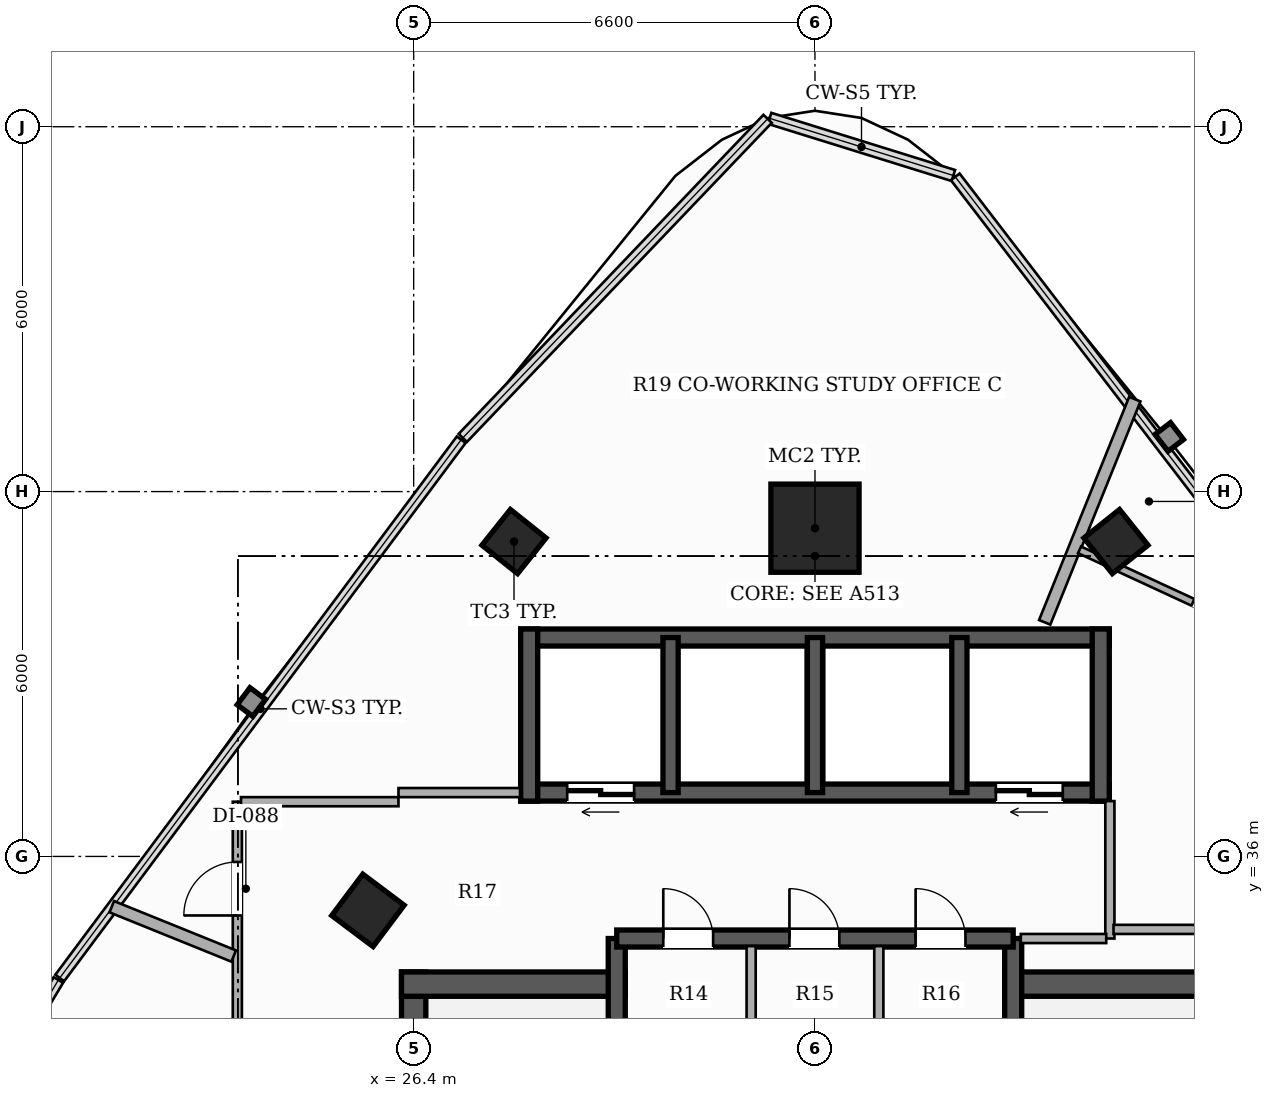
"""IFC4 building model, lengths in metres.
Left out: names, types, materials, properties, quantities, classifications, styles, units other than length and angle.
Written with IfcOpenShell. Run it as: python <this file> out.ifc"""

import sys

from ifc_helpers import new_model, si_unit, direction, frame, frame_2d, origin, origin_2d, place, context, subcontext, project, spatial, rectangle, hollow_rectangle, extrude, element, fill, save


model = new_model("IFC4")
c1 = context("Model", 3, precision=1e-05, world=origin(), true_north=direction((0.0, 1.0)))
c2 = subcontext(c1, "Body", "Model", "MODEL_VIEW")
j1 = project(units=[si_unit("LENGTHUNIT", "METRE"), si_unit("PLANEANGLEUNIT", "RADIAN")], contexts=[c1])
p1 = place(None, origin())
s1 = spatial("IfcSite", under=j1, at=p1, CompositionType="ELEMENT")
p2 = place(p1, origin())
s2 = spatial("IfcBuilding", under=s1, at=p2, CompositionType="ELEMENT")
p3 = place(p2, frame((0.0, 0.0, 150.65)))
s3 = spatial("IfcBuildingStorey", under=s2, at=p3, CompositionType="ELEMENT", Elevation=150.65)
p4 = place(p3, frame((26.4, 26.5, 0.0), z_axis=(0.0, 0.0, 1.0), x_axis=(0.0, 1.0, 0.0)))
e1 = element("IfcWall", 1, at=p4, inside=s3, PredefinedType="SHEAR", context=c2, shape_type="SweptSolid", body=[
    extrude(rectangle(XDim=7.6, YDim=0.4, at=frame_2d((3.8, 0.0))), origin(), (0.0, 0.0, 1.0), 3.3),
])
for number, where, z_axis, x_axis in (
    (2, (26.2, 33.9, 0.0), (0.0, 0.0, 1.0), (1.0, 0.0, 0.0)),
    (3, (36.12, 33.9, 0.0), (0.0, 0.0, 1.0), (1.0, 0.0, 0.0)),
):
    element("IfcWall", number, at=place(p3, frame(where, z_axis=z_axis, x_axis=x_axis)), inside=s3, PredefinedType="SHEAR", context=c2, shape_type="SweptSolid", body=[
        extrude(rectangle(XDim=3.68, YDim=0.4, at=frame_2d((1.84, 0.0))), origin(), (0.0, 0.0, 1.0), 3.3),
    ])
p5 = place(p3, frame((29.74, 26.5, 0.0), z_axis=(0.0, 0.0, 1.0), x_axis=(0.0, 1.0, 0.0)))
e4 = element("IfcWall", 4, at=p5, inside=s3, PredefinedType="SHEAR", context=c2, shape_type="SweptSolid", body=[
    extrude(rectangle(XDim=8.15, YDim=0.28, at=frame_2d((4.075, 0.0))), origin(), (0.0, 0.0, 1.0), 3.3),
])
p6 = place(p5, frame((0.6, 0.0, 0.0)))
e5 = element("IfcOpeningElement", 5, at=p6, cuts=e4, PredefinedType="OPENING", context=c2, shape_type="SweptSolid", body=[
    extrude(rectangle(XDim=1.05, YDim=2.15, at=frame_2d((0.525, 1.075))), frame((0.0, 0.15, 0.0), z_axis=(0.0, -1.0, 0.0), x_axis=(1.0, 0.0, 0.0)), (0.0, 0.0, 1.0), 0.3),
])
p7 = place(p3, frame((36.26, 26.5, 0.0), z_axis=(0.0, 0.0, 1.0), x_axis=(0.0, 1.0, 0.0)))
e6 = element("IfcWall", 6, at=p7, inside=s3, PredefinedType="SHEAR", context=c2, shape_type="SweptSolid", body=[
    extrude(rectangle(XDim=8.15, YDim=0.28, at=frame_2d((4.075, 0.0))), origin(), (0.0, 0.0, 1.0), 3.3),
])
p8 = place(p7, frame((0.6, 0.0, 0.0)))
e7 = element("IfcOpeningElement", 7, at=p8, cuts=e6, PredefinedType="OPENING", context=c2, shape_type="SweptSolid", body=[
    extrude(rectangle(XDim=1.05, YDim=2.15, at=frame_2d((0.525, 1.075))), frame((0.0, 0.15, 0.0), z_axis=(0.0, -1.0, 0.0), x_axis=(1.0, 0.0, 0.0)), (0.0, 0.0, 1.0), 0.3),
])
p9 = place(p3, frame((29.74, 34.65, 0.0), z_axis=(0.0, 0.0, 1.0), x_axis=(1.0, 0.0, 0.0)))
e8 = element("IfcWall", 8, at=p9, inside=s3, PredefinedType="SHEAR", context=c2, shape_type="SweptSolid", body=[
    extrude(rectangle(XDim=6.52, YDim=0.28, at=frame_2d((3.26, 0.0))), origin(), (0.0, 0.0, 1.0), 3.3),
])
p10 = place(p9, frame((0.765, 0.0, 0.0)))
e9 = element("IfcOpeningElement", 9, at=p10, cuts=e8, PredefinedType="OPENING", context=c2, shape_type="SweptSolid", body=[
    extrude(rectangle(XDim=0.82, YDim=2.1, at=frame_2d((0.41, 1.05))), frame((0.0, 0.15, 0.0), z_axis=(0.0, -1.0, 0.0), x_axis=(1.0, 0.0, 0.0)), (0.0, 0.0, 1.0), 0.3),
])
p11 = place(p9, frame((2.84, 0.0, 0.0)))
e10 = element("IfcOpeningElement", 10, at=p11, cuts=e8, PredefinedType="OPENING", context=c2, shape_type="SweptSolid", body=[
    extrude(rectangle(XDim=0.82, YDim=2.1, at=frame_2d((0.41, 1.05))), frame((0.0, 0.15, 0.0), z_axis=(0.0, -1.0, 0.0), x_axis=(1.0, 0.0, 0.0)), (0.0, 0.0, 1.0), 0.3),
])
p12 = place(p9, frame((4.915, 0.0, 0.0)))
e11 = element("IfcOpeningElement", 11, at=p12, cuts=e8, PredefinedType="OPENING", context=c2, shape_type="SweptSolid", body=[
    extrude(rectangle(XDim=0.82, YDim=2.1, at=frame_2d((0.41, 1.05))), frame((0.0, 0.15, 0.0), z_axis=(0.0, -1.0, 0.0), x_axis=(1.0, 0.0, 0.0)), (0.0, 0.0, 1.0), 0.3),
])
p13 = place(p3, frame((37.84, 37.05, 0.0), z_axis=(0.0, 0.0, 1.0), x_axis=(-1.0, 0.0, 0.0)))
e12 = element("IfcWall", 12, at=p13, inside=s3, PredefinedType="SHEAR", context=c2, shape_type="SweptSolid", body=[
    extrude(rectangle(XDim=9.68, YDim=0.28, at=frame_2d((4.84, 0.0))), origin(), (0.0, 0.0, 1.0), 3.3),
])
p14 = place(p13, frame((7.815, 0.0, 0.0)))
e13 = element("IfcOpeningElement", 13, at=p14, cuts=e12, PredefinedType="OPENING", context=c2, shape_type="SweptSolid", body=[
    extrude(rectangle(XDim=1.1, YDim=2.2, at=frame_2d((0.55, 1.1))), frame((0.0, 0.15, 0.0), z_axis=(0.0, -1.0, 0.0), x_axis=(1.0, 0.0, 0.0)), (0.0, 0.0, 1.0), 0.3),
])
p15 = place(p13, frame((0.765, 0.0, 0.0)))
e14 = element("IfcOpeningElement", 14, at=p15, cuts=e12, PredefinedType="OPENING", context=c2, shape_type="SweptSolid", body=[
    extrude(rectangle(XDim=1.1, YDim=2.2, at=frame_2d((0.55, 1.1))), frame((0.0, 0.15, 0.0), z_axis=(0.0, -1.0, 0.0), x_axis=(1.0, 0.0, 0.0)), (0.0, 0.0, 1.0), 0.3),
])
p16 = place(p3, frame((28.16, 39.6, 0.0), z_axis=(0.0, 0.0, 1.0), x_axis=(1.0, 0.0, 0.0)))
e15 = element("IfcWall", 15, at=p16, inside=s3, PredefinedType="SHEAR", context=c2, shape_type="SweptSolid", body=[
    extrude(rectangle(XDim=9.68, YDim=0.28, at=frame_2d((4.84, 0.0))), origin(), (0.0, 0.0, 1.0), 3.3),
])
for number, where, z_axis, x_axis in (
    (16, (28.3, 36.91, 0.0), (0.0, 0.0, 1.0), (0.0, 1.0, 0.0)),
    (17, (37.7, 36.91, 0.0), (0.0, 0.0, 1.0), (0.0, 1.0, 0.0)),
):
    element("IfcWall", number, at=place(p3, frame(where, z_axis=z_axis, x_axis=x_axis)), inside=s3, PredefinedType="SHEAR", context=c2, shape_type="SweptSolid", body=[
        extrude(rectangle(XDim=2.83, YDim=0.28, at=frame_2d((1.415, 0.0))), origin(), (0.0, 0.0, 1.0), 3.3),
    ])
for number, where, z_axis, x_axis in (
    (18, (30.625, 37.05, 0.0), (0.0, 0.0, 1.0), (0.0, 1.0, 0.0)),
    (19, (33.0, 37.05, 0.0), (0.0, 0.0, 1.0), (0.0, 1.0, 0.0)),
    (20, (35.375, 37.05, 0.0), (0.0, 0.0, 1.0), (0.0, 1.0, 0.0)),
):
    element("IfcWall", number, at=place(p3, frame(where, z_axis=z_axis, x_axis=x_axis)), inside=s3, PredefinedType="SHEAR", context=c2, shape_type="SweptSolid", body=[
        extrude(rectangle(XDim=2.55, YDim=0.25, at=frame_2d((1.275, 0.0))), origin(), (0.0, 0.0, 1.0), 3.3),
    ])
p17 = place(p3, frame((33.0, 41.398, 0.0), z_axis=(0.0, 0.0, 1.0), x_axis=(1.0, 0.0, 0.0)))
e21 = element("IfcColumn", 21, at=p17, inside=s3, PredefinedType="COLUMN", context=c2, shape_type="SweptSolid", body=[
    extrude(hollow_rectangle(XDim=1.45, YDim=1.45, WallThickness=0.045, at=origin_2d()), origin(), (0.0, 0.0, 1.0), 3.3),
])
p18 = place(p3, frame((25.648, 35.113, 0.0), z_axis=(0.0, 0.0, 1.0), x_axis=(0.600420225326, 0.799684658487, 0.0)))
e22 = element("IfcColumn", 22, at=p18, inside=s3, PredefinedType="COLUMN", context=c2, shape_type="SweptSolid", body=[
    extrude(hollow_rectangle(XDim=0.85, YDim=0.85, WallThickness=0.028, at=origin_2d()), origin(), (0.0, 0.0, 1.0), 3.3),
])
for number, where, z_axis, x_axis in (
    (23, (28.05, 41.178, 0.0), (0.0, 0.0, 1.0), (0.624, 0.782, 0.0)),
    (24, (37.95, 41.178, 0.0), (0.0, 0.0, 1.0), (-0.624, 0.782, 0.0)),
):
    element("IfcColumn", number, at=place(p3, frame(where, z_axis=z_axis, x_axis=x_axis)), inside=s3, PredefinedType="COLUMN", context=c2, shape_type="SweptSolid", body=[
        extrude(hollow_rectangle(XDim=0.75, YDim=0.75, WallThickness=0.025, at=origin_2d()), origin(), (0.0, 0.0, 1.0), 3.3),
    ])
p19 = place(p3, frame((37.85, 34.65, 0.0), z_axis=(0.0, 0.0, 1.0), x_axis=(0.0, 1.0, 0.0)))
e25 = element("IfcWall", 25, at=p19, inside=s3, PredefinedType="PARTITIONING", context=c2, shape_type="SweptSolid", body=[
    extrude(rectangle(XDim=2.26, YDim=0.15, at=frame_2d((1.13, 0.0))), origin(), (0.0, 0.0, 1.0), 3.06),
])
p20 = place(p3, frame((36.385, 34.65, 0.0), z_axis=(0.0, 0.0, 1.0), x_axis=(1.0, 0.0, 0.0)))
e26 = element("IfcWall", 26, at=p20, inside=s3, PredefinedType="PARTITIONING", context=c2, shape_type="SweptSolid", body=[
    extrude(rectangle(XDim=1.405, YDim=0.15, at=frame_2d((0.703, 0.0))), origin(), (0.0, 0.0, 1.0), 2.425),
])
for number, where, z_axis, x_axis in (
    (27, (31.95, 32.915, 0.0), (0.0, 0.0, 1.0), (0.0, 1.0, 0.0)),
    (28, (34.05, 32.915, 0.0), (0.0, 0.0, 1.0), (0.0, 1.0, 0.0)),
):
    element("IfcWall", number, at=place(p3, frame(where, z_axis=z_axis, x_axis=x_axis)), inside=s3, PredefinedType="PARTITIONING", context=c2, shape_type="SweptSolid", body=[
        extrude(rectangle(XDim=1.61, YDim=0.15, at=frame_2d((0.805, 0.0))), origin(), (0.0, 0.0, 1.0), 3.06),
    ])
p21 = place(p3, frame((23.5, 14.06, 0.0), z_axis=(0.0, 0.0, 1.0), x_axis=(0.0, 1.0, 0.0)))
e29 = element("IfcWall", 29, at=p21, inside=s3, PredefinedType="PARTITIONING", context=c2, shape_type="SweptSolid", body=[
    extrude(rectangle(XDim=22.84, YDim=0.15, at=frame_2d((11.42, 0.0))), origin(), (0.0, 0.0, 1.0), 2.413),
])
p22 = place(p21, frame((8.172, 0.0, 0.0)))
e30 = element("IfcOpeningElement", 30, at=p22, cuts=e29, PredefinedType="OPENING", context=c2, shape_type="SweptSolid", body=[
    extrude(rectangle(XDim=0.88, YDim=2.1, at=frame_2d((0.44, 1.05))), frame((0.0, 0.085, 0.0), z_axis=(0.0, -1.0, 0.0), x_axis=(1.0, 0.0, 0.0)), (0.0, 0.0, 1.0), 0.17),
])
p23 = place(p21, frame((20.969, 0.0, 0.0)))
e31 = element("IfcOpeningElement", 31, at=p23, cuts=e29, PredefinedType="OPENING", context=c2, shape_type="SweptSolid", body=[
    extrude(rectangle(XDim=0.88, YDim=2.1, at=frame_2d((0.44, 1.05))), frame((0.0, 0.085, 0.0), z_axis=(0.0, -1.0, 0.0), x_axis=(1.0, 0.0, 0.0)), (0.0, 0.0, 1.0), 0.17),
])
p24 = place(p21, frame((15.484, 0.0, 0.0)))
e32 = element("IfcOpeningElement", 32, at=p24, cuts=e29, PredefinedType="OPENING", context=c2, shape_type="SweptSolid", body=[
    extrude(rectangle(XDim=0.88, YDim=2.1, at=frame_2d((0.44, 1.05))), frame((0.0, 0.085, 0.0), z_axis=(0.0, -1.0, 0.0), x_axis=(1.0, 0.0, 0.0)), (0.0, 0.0, 1.0), 0.17),
])
p25 = place(p3, frame((23.56, 36.9, 0.0), z_axis=(0.0, 0.0, 1.0), x_axis=(1.0, 0.0, 0.0)))
e33 = element("IfcWall", 33, at=p25, inside=s3, PredefinedType="PARTITIONING", context=c2, shape_type="SweptSolid", body=[
    extrude(rectangle(XDim=2.59, YDim=0.15, at=frame_2d((1.295, 0.0))), origin(), (0.0, 0.0, 1.0), 2.413),
])
p26 = place(p3, frame((26.15, 37.05, 0.0), z_axis=(0.0, 0.0, 1.0), x_axis=(1.0, 0.0, 0.0)))
e34 = element("IfcWall", 34, at=p26, inside=s3, PredefinedType="PARTITIONING", context=c2, shape_type="SweptSolid", body=[
    extrude(rectangle(XDim=2.0, YDim=0.15, at=frame_2d((1.0, 0.0))), origin(), (0.0, 0.0, 1.0), 2.413),
])
p27 = place(p3, frame((37.91, 34.8, 0.0), z_axis=(0.0, 0.0, 1.0), x_axis=(1.0, 0.0, 0.0)))
e35 = element("IfcWall", 35, at=p27, inside=s3, PredefinedType="PARTITIONING", context=c2, shape_type="SweptSolid", body=[
    extrude(rectangle(XDim=1.94, YDim=0.15, at=frame_2d((0.97, 0.0))), origin(), (0.0, 0.0, 1.0), 2.721),
])
p28 = place(p3, frame((36.778, 39.85, 0.0), z_axis=(0.0, 0.0, 1.0), x_axis=(0.374430412004, 0.927255017008, 0.0)))
e36 = element("IfcWall", 36, at=p28, inside=s3, PredefinedType="PARTITIONING", context=c2, shape_type="SweptSolid", body=[
    extrude(rectangle(XDim=3.958, YDim=0.2, at=frame_2d((1.979, 0.0))), origin(), (0.0, 0.0, 1.0), 2.413),
])
p29 = place(p3, frame((23.44, 34.362, 0.0), z_axis=(0.0, 0.0, 1.0), x_axis=(-0.927021575741, 0.375007997395, 0.0)))
e37 = element("IfcWall", 37, at=p29, inside=s3, PredefinedType="PARTITIONING", context=c2, shape_type="SweptSolid", body=[
    extrude(rectangle(XDim=2.163, YDim=0.2, at=frame_2d((1.081, 0.0))), origin(), (0.0, 0.0, 1.0), 3.06),
])
p30 = place(p3, frame((37.351, 41.042, 0.0), z_axis=(0.0, 0.0, 1.0), x_axis=(0.907592371503, -0.419852458834, 0.0)))
e38 = element("IfcWall", 38, at=p30, inside=s3, PredefinedType="PARTITIONING", context=c2, shape_type="SweptSolid", body=[
    extrude(rectangle(XDim=4.93, YDim=0.12, at=frame_2d((2.465, 0.0))), origin(), (0.0, 0.0, 1.0), 2.413),
])
p31 = place(p30, frame((2.055, 0.0, 0.0)))
e39 = element("IfcOpeningElement", 39, at=p31, cuts=e38, PredefinedType="OPENING", context=c2, shape_type="SweptSolid", body=[
    extrude(rectangle(XDim=0.82, YDim=2.1, at=frame_2d((0.41, 1.05))), frame((0.0, 0.07, 0.0), z_axis=(0.0, -1.0, 0.0), x_axis=(1.0, 0.0, 0.0)), (0.0, 0.0, 1.0), 0.14),
])
p32 = place(p14, origin())
e40 = element("IfcDoor", 40, at=p32, inside=s3, OperationType="DOUBLE_DOOR_SLIDING", PredefinedType="DOOR", context=c2, shape_type="SweptSolid", body=[
    extrude(rectangle(XDim=1.1, YDim=2.2, at=frame_2d((0.55, 1.1))), frame((0.0, 0.025, 0.0), z_axis=(0.0, -1.0, 0.0), x_axis=(1.0, 0.0, 0.0)), (0.0, 0.0, 1.0), 0.05),
])
fill(e13, e40)
p33 = place(p15, origin())
e41 = element("IfcDoor", 41, at=p33, inside=s3, OperationType="DOUBLE_DOOR_SLIDING", PredefinedType="DOOR", context=c2, shape_type="SweptSolid", body=[
    extrude(rectangle(XDim=1.1, YDim=2.2, at=frame_2d((0.55, 1.1))), frame((0.0, 0.025, 0.0), z_axis=(0.0, -1.0, 0.0), x_axis=(1.0, 0.0, 0.0)), (0.0, 0.0, 1.0), 0.05),
])
fill(e14, e41)
p34 = place(p10, origin())
e42 = element("IfcDoor", 42, at=p34, inside=s3, OperationType="SINGLE_SWING_LEFT", PredefinedType="DOOR", context=c2, shape_type="SweptSolid", body=[
    extrude(rectangle(XDim=0.82, YDim=2.1, at=frame_2d((0.41, 1.05))), frame((0.0, 0.025, 0.0), z_axis=(0.0, -1.0, 0.0), x_axis=(1.0, 0.0, 0.0)), (0.0, 0.0, 1.0), 0.05),
])
fill(e9, e42)
p35 = place(p11, origin())
e43 = element("IfcDoor", 43, at=p35, inside=s3, OperationType="SINGLE_SWING_LEFT", PredefinedType="DOOR", context=c2, shape_type="SweptSolid", body=[
    extrude(rectangle(XDim=0.82, YDim=2.1, at=frame_2d((0.41, 1.05))), frame((0.0, 0.025, 0.0), z_axis=(0.0, -1.0, 0.0), x_axis=(1.0, 0.0, 0.0)), (0.0, 0.0, 1.0), 0.05),
])
fill(e10, e43)
p36 = place(p12, origin())
e44 = element("IfcDoor", 44, at=p36, inside=s3, OperationType="SINGLE_SWING_LEFT", PredefinedType="DOOR", context=c2, shape_type="SweptSolid", body=[
    extrude(rectangle(XDim=0.82, YDim=2.1, at=frame_2d((0.41, 1.05))), frame((0.0, 0.025, 0.0), z_axis=(0.0, -1.0, 0.0), x_axis=(1.0, 0.0, 0.0)), (0.0, 0.0, 1.0), 0.05),
])
fill(e11, e44)
p37 = place(p31, origin())
e45 = element("IfcDoor", 45, at=p37, inside=s3, OperationType="SINGLE_SWING_RIGHT", PredefinedType="DOOR", context=c2, shape_type="SweptSolid", body=[
    extrude(rectangle(XDim=0.82, YDim=2.1, at=frame_2d((0.41, 1.05))), frame((0.0, 0.025, 0.0), z_axis=(0.0, -1.0, 0.0), x_axis=(1.0, 0.0, 0.0)), (0.0, 0.0, 1.0), 0.05),
])
fill(e39, e45)
p38 = place(p23, origin())
e46 = element("IfcDoor", 46, at=p38, inside=s3, OperationType="SINGLE_SWING_LEFT", PredefinedType="DOOR", context=c2, shape_type="SweptSolid", body=[
    extrude(rectangle(XDim=0.88, YDim=2.1, at=frame_2d((0.44, 1.05))), frame((0.0, 0.025, 0.0), z_axis=(0.0, -1.0, 0.0), x_axis=(1.0, 0.0, 0.0)), (0.0, 0.0, 1.0), 0.05),
])
fill(e31, e46)
save(model, sys.argv[1])
